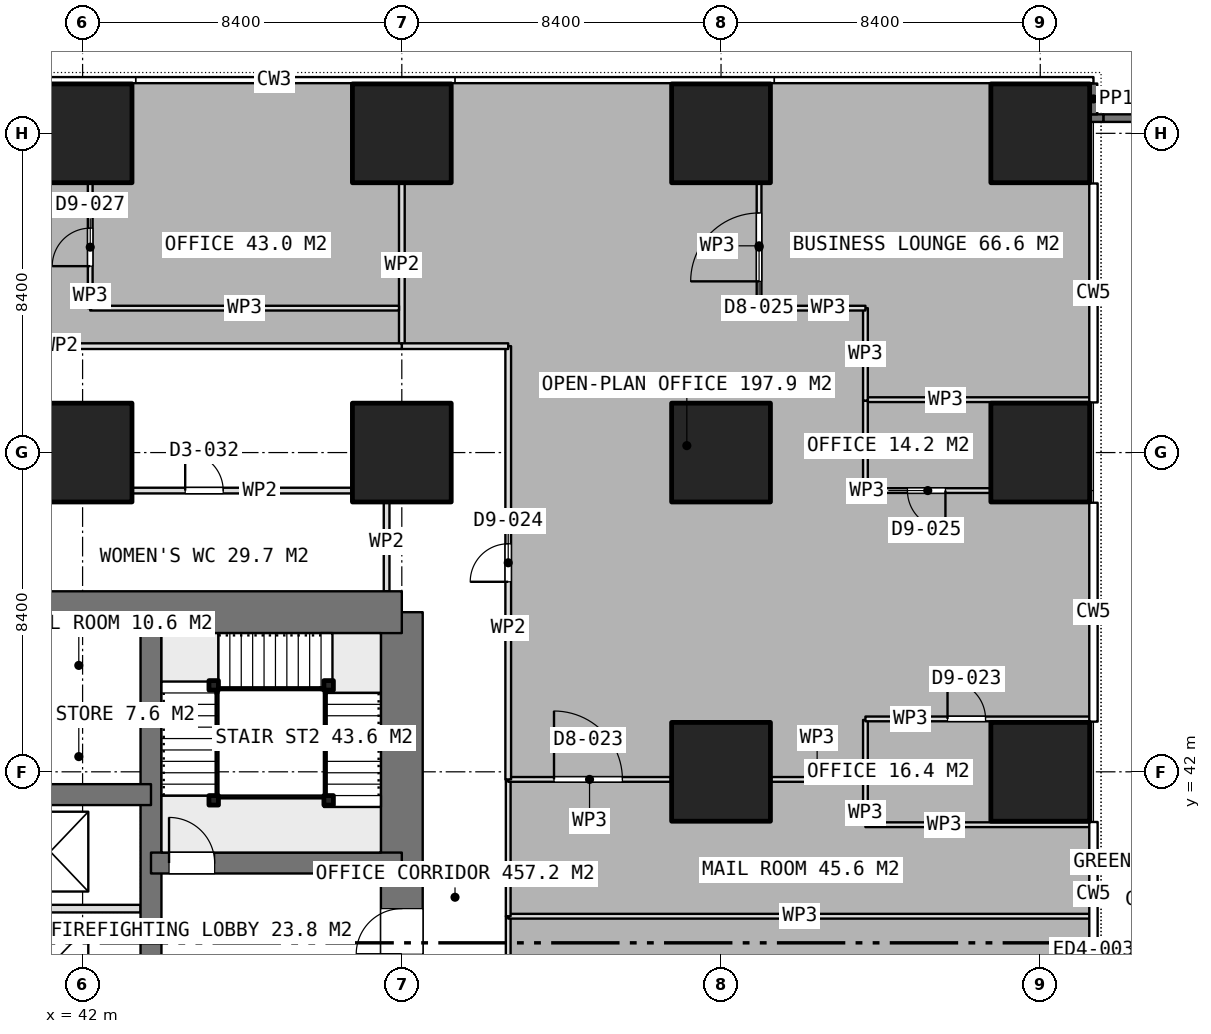
"""IFC4 building model, lengths in metres.
Left out: names, types, materials, properties, quantities, classifications, styles, units other than length and angle.
Written with IfcOpenShell. Run it as: python <this file> out.ifc"""

import sys

from ifc_helpers import new_model, si_unit, direction, frame, frame_2d, origin, origin_2d, place, context, subcontext, project, spatial, rectangle, extrude, element, fill, save


model = new_model("IFC4")
c1 = context("Model", 3, precision=1e-05, world=origin(), true_north=direction((0.0, 1.0)))
c2 = subcontext(c1, "Body", "Model", "MODEL_VIEW")
j1 = project(units=[si_unit("LENGTHUNIT", "METRE"), si_unit("PLANEANGLEUNIT", "RADIAN")], contexts=[c1])
p1 = place(None, origin())
s1 = spatial("IfcSite", under=j1, at=p1, CompositionType="ELEMENT")
p2 = place(p1, origin())
s2 = spatial("IfcBuilding", under=s1, at=p2, CompositionType="ELEMENT")
p3 = place(p2, frame((0.0, 0.0, 25.4)))
s3 = spatial("IfcBuildingStorey", under=s2, at=p3, CompositionType="ELEMENT", Elevation=25.4)
p4 = place(p3, frame((40.0, 46.2, 0.0), z_axis=(0.0, 0.0, 1.0), x_axis=(1.0, 0.0, 0.0)))
e1 = element("IfcWall", 1, at=p4, inside=s3, PredefinedType="SHEAR", context=c2, shape_type="SweptSolid", body=[
    extrude(rectangle(XDim=10.4, YDim=1.1, at=frame_2d((5.2, 0.0))), origin(), (0.0, 0.0, 1.0), 3.75),
])
p5 = place(p3, frame((50.4, 21.0, 0.0), z_axis=(0.0, 0.0, 1.0), x_axis=(0.0, 1.0, 0.0)))
e2 = element("IfcWall", 2, at=p5, inside=s3, PredefinedType="SHEAR", context=c2, shape_type="SweptSolid", body=[
    extrude(rectangle(XDim=25.2, YDim=1.1, at=frame_2d((12.6, 0.0))), origin(), (0.0, 0.0, 1.0), 3.75),
])
p6 = place(p5, frame((16.2, 0.0, 0.0)))
e3 = element("IfcOpeningElement", 3, at=p6, cuts=e2, PredefinedType="OPENING", context=c2, shape_type="SweptSolid", body=[
    extrude(rectangle(XDim=1.2, YDim=2.1, at=frame_2d((0.6, 1.05))), frame((0.0, 0.56, 0.0), z_axis=(0.0, -1.0, 0.0), x_axis=(1.0, 0.0, 0.0)), (0.0, 0.0, 1.0), 1.12),
])
p7 = place(p5, frame((10.05, 0.0, 0.0)))
e4 = element("IfcOpeningElement", 4, at=p7, cuts=e2, PredefinedType="OPENING", context=c2, shape_type="SweptSolid", body=[
    extrude(rectangle(XDim=0.9, YDim=2.1, at=frame_2d((0.45, 1.05))), frame((0.0, 0.56, 0.0), z_axis=(0.0, -1.0, 0.0), x_axis=(1.0, 0.0, 0.0)), (0.0, 0.0, 1.0), 1.12),
])
p8 = place(p5, frame((7.45, 0.0, 0.0)))
e5 = element("IfcOpeningElement", 5, at=p8, cuts=e2, PredefinedType="OPENING", context=c2, shape_type="SweptSolid", body=[
    extrude(rectangle(XDim=0.9, YDim=2.1, at=frame_2d((0.45, 1.05))), frame((0.0, 0.56, 0.0), z_axis=(0.0, -1.0, 0.0), x_axis=(1.0, 0.0, 0.0)), (0.0, 0.0, 1.0), 1.12),
])
p9 = place(p5, frame((0.75, 0.0, 0.0)))
e6 = element("IfcOpeningElement", 6, at=p9, cuts=e2, PredefinedType="OPENING", context=c2, shape_type="SweptSolid", body=[
    extrude(rectangle(XDim=1.2, YDim=2.1, at=frame_2d((0.6, 1.05))), frame((0.0, 0.56, 0.0), z_axis=(0.0, -1.0, 0.0), x_axis=(1.0, 0.0, 0.0)), (0.0, 0.0, 1.0), 1.12),
])
p10 = place(p3, frame((43.8, 21.0, 0.0), z_axis=(0.0, 0.0, 1.0), x_axis=(0.0, 1.0, 0.0)))
e7 = element("IfcWall", 7, at=p10, inside=s3, PredefinedType="SHEAR", context=c2, shape_type="SweptSolid", body=[
    extrude(rectangle(XDim=25.2, YDim=0.55, at=frame_2d((12.6, 0.0))), origin(), (0.0, 0.0, 1.0), 3.75),
])
p11 = place(p3, frame((40.0, 41.4, 0.0), z_axis=(0.0, 0.0, 1.0), x_axis=(1.0, 0.0, 0.0)))
e8 = element("IfcWall", 8, at=p11, inside=s3, PredefinedType="SHEAR", context=c2, shape_type="SweptSolid", body=[
    extrude(rectangle(XDim=3.8, YDim=0.55, at=frame_2d((1.9, 0.0))), origin(), (0.0, 0.0, 1.0), 3.75),
])
p12 = place(p3, frame((43.8, 39.6, 0.0), z_axis=(0.0, 0.0, 1.0), x_axis=(1.0, 0.0, 0.0)))
e9 = element("IfcWall", 9, at=p12, inside=s3, PredefinedType="SHEAR", context=c2, shape_type="SweptSolid", body=[
    extrude(rectangle(XDim=6.6, YDim=0.55, at=frame_2d((3.3, 0.0))), origin(), (0.0, 0.0, 1.0), 3.75),
])
p13 = place(p12, frame((0.475, 0.0, 0.0)))
e10 = element("IfcOpeningElement", 10, at=p13, cuts=e9, PredefinedType="OPENING", context=c2, shape_type="SweptSolid", body=[
    extrude(rectangle(XDim=1.2, YDim=2.1, at=frame_2d((0.6, 1.05))), frame((0.0, 0.285, 0.0), z_axis=(0.0, -1.0, 0.0), x_axis=(1.0, 0.0, 0.0)), (0.0, 0.0, 1.0), 0.57),
])
for number, where, z_axis, x_axis in (
    (11, (42.0, 50.4, 0.0), (0.0, 0.0, 1.0), (1.0, 0.0, 0.0)),
    (12, (42.0, 58.8, 0.0), (0.0, 0.0, 1.0), (1.0, 0.0, 0.0)),
    (13, (50.4, 50.4, 0.0), (0.0, 0.0, 1.0), (1.0, 0.0, 0.0)),
    (14, (50.4, 58.8, 0.0), (0.0, 0.0, 1.0), (1.0, 0.0, 0.0)),
    (15, (58.8, 42.0, 0.0), (0.0, 0.0, 1.0), (1.0, 0.0, 0.0)),
    (16, (58.8, 50.4, 0.0), (0.0, 0.0, 1.0), (1.0, 0.0, 0.0)),
    (17, (58.8, 58.8, 0.0), (0.0, 0.0, 1.0), (1.0, 0.0, 0.0)),
    (18, (67.2, 42.0, 0.0), (0.0, 0.0, 1.0), (1.0, 0.0, 0.0)),
    (19, (67.2, 50.4, 0.0), (0.0, 0.0, 1.0), (1.0, 0.0, 0.0)),
    (20, (67.2, 58.8, 0.0), (0.0, 0.0, 1.0), (1.0, 0.0, 0.0)),
):
    element("IfcColumn", number, at=place(p3, frame(where, z_axis=z_axis, x_axis=x_axis)), inside=s3, PredefinedType="COLUMN", context=c2, shape_type="SweptSolid", body=[
        extrude(rectangle(XDim=2.6, YDim=2.6, at=origin_2d()), origin(), (0.0, 0.0, 1.0), 3.75),
    ])
p14 = place(p3, frame((76.0, 59.2, 0.0), z_axis=(0.0, 0.0, 1.0), x_axis=(-1.0, 0.0, 0.0)))
e21 = element("IfcWall", 21, at=p14, inside=s3, PredefinedType="PARAPET", context=c2, shape_type="SweptSolid", body=[
    extrude(rectangle(XDim=7.14, YDim=0.2, at=frame_2d((3.57, 0.0))), origin(), (0.0, 0.0, 1.0), 1.1),
])
p15 = place(p3, frame((68.86, 59.2, 0.0), z_axis=(0.0, 0.0, 1.0), x_axis=(-1.0, 0.0, 0.0)))
e22 = element("IfcWall", 22, at=p15, inside=s3, PredefinedType="PARAPET", context=c2, shape_type="SweptSolid", body=[
    extrude(rectangle(XDim=0.36, YDim=0.2, at=frame_2d((0.18, 0.0))), origin(), (0.0, 0.0, 1.0), 1.1),
])
p16 = place(p3, frame((68.6, 59.3, 0.0), z_axis=(0.0, 0.0, 1.0), x_axis=(0.0, 1.0, 0.0)))
e23 = element("IfcWall", 23, at=p16, inside=s3, PredefinedType="PARAPET", context=c2, shape_type="SweptSolid", body=[
    extrude(rectangle(XDim=0.81, YDim=0.2, at=frame_2d((0.405, 0.0))), origin(), (0.0, 0.0, 1.0), 1.1),
])
p17 = place(p3, frame((40.275, 38.4, 0.0), z_axis=(0.0, 0.0, 1.0), x_axis=(1.0, 0.0, 0.0)))
e24 = element("IfcWall", 24, at=p17, inside=s3, PredefinedType="PARTITIONING", context=c2, shape_type="SweptSolid", body=[
    extrude(rectangle(XDim=3.25, YDim=0.2, at=frame_2d((1.625, 0.0))), origin(), (0.0, 0.0, 1.0), 3.5),
])
p18 = place(p3, frame((40.0, 43.4, 0.0), z_axis=(0.0, 0.0, 1.0), x_axis=(1.0, 0.0, 0.0)))
e25 = element("IfcWall", 25, at=p18, inside=s3, PredefinedType="PARTITIONING", context=c2, shape_type="SweptSolid", body=[
    extrude(rectangle(XDim=3.525, YDim=0.2, at=frame_2d((1.762, 0.0))), origin(), (0.0, 0.0, 1.0), 3.5),
])
p19 = place(p3, frame((40.325, 49.4, 0.0), z_axis=(0.0, 0.0, 1.0), x_axis=(1.0, 0.0, 0.0)))
e26 = element("IfcWall", 26, at=p19, inside=s3, PredefinedType="PARTITIONING", context=c2, shape_type="SweptSolid", body=[
    extrude(rectangle(XDim=9.75, YDim=0.15, at=frame_2d((4.875, 0.0))), origin(), (0.0, 0.0, 1.0), 3.5),
])
p20 = place(p19, frame((4.375, 0.0, 0.0)))
e27 = element("IfcOpeningElement", 27, at=p20, cuts=e26, PredefinedType="OPENING", context=c2, shape_type="SweptSolid", body=[
    extrude(rectangle(XDim=1.0, YDim=2.1, at=frame_2d((0.5, 1.05))), frame((0.0, 0.085, 0.0), z_axis=(0.0, -1.0, 0.0), x_axis=(1.0, 0.0, 0.0)), (0.0, 0.0, 1.0), 0.17),
])
p21 = place(p3, frame((50.0, 46.75, 0.0), z_axis=(0.0, 0.0, 1.0), x_axis=(0.0, 1.0, 0.0)))
e28 = element("IfcWall", 28, at=p21, inside=s3, PredefinedType="PARTITIONING", context=c2, shape_type="SweptSolid", body=[
    extrude(rectangle(XDim=2.575, YDim=0.15, at=frame_2d((1.288, 0.0))), origin(), (0.0, 0.0, 1.0), 3.5),
])
p22 = place(p3, frame((68.52, 40.608, 0.0), z_axis=(0.0, 0.0, 1.0), x_axis=(-1.0, 0.0, 0.0)))
e29 = element("IfcWall", 29, at=p22, inside=s3, PredefinedType="PARTITIONING", context=c2, shape_type="SweptSolid", body=[
    extrude(rectangle(XDim=5.92, YDim=0.125, at=frame_2d((2.96, 0.0))), origin(), (0.0, 0.0, 1.0), 3.5),
])
p23 = place(p3, frame((62.6, 40.636, 0.0), z_axis=(0.0, 0.0, 1.0), x_axis=(0.0, 1.0, 0.0)))
e30 = element("IfcWall", 30, at=p23, inside=s3, PredefinedType="PARTITIONING", context=c2, shape_type="SweptSolid", body=[
    extrude(rectangle(XDim=2.729, YDim=0.125, at=frame_2d((1.365, 0.0))), origin(), (0.0, 0.0, 1.0), 3.5),
])
p24 = place(p3, frame((62.6, 43.392, 0.0), z_axis=(0.0, 0.0, 1.0), x_axis=(1.0, 0.0, 0.0)))
e31 = element("IfcWall", 31, at=p24, inside=s3, PredefinedType="PARTITIONING", context=c2, shape_type="SweptSolid", body=[
    extrude(rectangle(XDim=5.92, YDim=0.125, at=frame_2d((2.96, 0.0))), origin(), (0.0, 0.0, 1.0), 3.5),
])
p25 = place(p24, frame((2.16, 0.0, 0.0)))
e32 = element("IfcOpeningElement", 32, at=p25, cuts=e31, PredefinedType="OPENING", context=c2, shape_type="SweptSolid", body=[
    extrude(rectangle(XDim=1.0, YDim=2.1, at=frame_2d((0.5, 1.05))), frame((0.0, 0.073, 0.0), z_axis=(0.0, -1.0, 0.0), x_axis=(1.0, 0.0, 0.0)), (0.0, 0.0, 1.0), 0.145),
])
p26 = place(p3, frame((65.88, 49.4, 0.0), z_axis=(0.0, 0.0, 1.0), x_axis=(-1.0, 0.0, 0.0)))
e33 = element("IfcWall", 33, at=p26, inside=s3, PredefinedType="PARTITIONING", context=c2, shape_type="SweptSolid", body=[
    extrude(rectangle(XDim=3.28, YDim=0.125, at=frame_2d((1.64, 0.0))), origin(), (0.0, 0.0, 1.0), 3.5),
])
p27 = place(p26, frame((1.175, 0.0, 0.0)))
e34 = element("IfcOpeningElement", 34, at=p27, cuts=e33, PredefinedType="OPENING", context=c2, shape_type="SweptSolid", body=[
    extrude(rectangle(XDim=1.0, YDim=2.1, at=frame_2d((0.5, 1.05))), frame((0.0, 0.073, 0.0), z_axis=(0.0, -1.0, 0.0), x_axis=(1.0, 0.0, 0.0)), (0.0, 0.0, 1.0), 0.145),
])
p28 = place(p3, frame((62.6, 49.4, 0.0), z_axis=(0.0, 0.0, 1.0), x_axis=(0.0, 1.0, 0.0)))
e35 = element("IfcWall", 35, at=p28, inside=s3, PredefinedType="PARTITIONING", context=c2, shape_type="SweptSolid", body=[
    extrude(rectangle(XDim=2.365, YDim=0.125, at=frame_2d((1.183, 0.0))), origin(), (0.0, 0.0, 1.0), 3.5),
])
p29 = place(p3, frame((62.663, 51.792, 0.0), z_axis=(0.0, 0.0, 1.0), x_axis=(1.0, 0.0, 0.0)))
e36 = element("IfcWall", 36, at=p29, inside=s3, PredefinedType="PARTITIONING", context=c2, shape_type="SweptSolid", body=[
    extrude(rectangle(XDim=5.857, YDim=0.125, at=frame_2d((2.928, 0.0))), origin(), (0.0, 0.0, 1.0), 3.5),
])
p30 = place(p3, frame((59.801, 54.2, 0.0), z_axis=(0.0, 0.0, 1.0), x_axis=(0.0, 1.0, 0.0)))
e37 = element("IfcWall", 37, at=p30, inside=s3, PredefinedType="PARTITIONING", context=c2, shape_type="SweptSolid", body=[
    extrude(rectangle(XDim=3.28, YDim=0.125, at=frame_2d((1.64, 0.0))), origin(), (0.0, 0.0, 1.0), 3.5),
])
p31 = place(p30, frame((0.705, 0.0, 0.0)))
e38 = element("IfcOpeningElement", 38, at=p31, cuts=e37, PredefinedType="OPENING", context=c2, shape_type="SweptSolid", body=[
    extrude(rectangle(XDim=1.8, YDim=2.1, at=frame_2d((0.9, 1.05))), frame((0.0, 0.073, 0.0), z_axis=(0.0, -1.0, 0.0), x_axis=(1.0, 0.0, 0.0)), (0.0, 0.0, 1.0), 0.145),
])
p32 = place(p3, frame((62.6, 51.766, 0.0), z_axis=(0.0, 0.0, 1.0), x_axis=(0.0, 1.0, 0.0)))
e39 = element("IfcWall", 39, at=p32, inside=s3, PredefinedType="PARTITIONING", context=c2, shape_type="SweptSolid", body=[
    extrude(rectangle(XDim=2.434, YDim=0.125, at=frame_2d((1.217, 0.0))), origin(), (0.0, 0.0, 1.0), 3.5),
])
p33 = place(p3, frame((62.6, 54.2, 0.0), z_axis=(0.0, 0.0, 1.0), x_axis=(-1.0, 0.0, 0.0)))
e40 = element("IfcWall", 40, at=p33, inside=s3, PredefinedType="PARTITIONING", context=c2, shape_type="SweptSolid", body=[
    extrude(rectangle(XDim=2.799, YDim=0.125, at=frame_2d((1.399, 0.0))), origin(), (0.0, 0.0, 1.0), 3.5),
])
p34 = place(p3, frame((53.2, 31.2, 0.0), z_axis=(0.0, 0.0, 1.0), x_axis=(0.0, 1.0, 0.0)))
e41 = element("IfcWall", 41, at=p34, inside=s3, PredefinedType="PARTITIONING", context=c2, shape_type="SweptSolid", body=[
    extrude(rectangle(XDim=7.0, YDim=0.125, at=frame_2d((3.5, 0.0))), origin(), (0.0, 0.0, 1.0), 3.5),
])
p35 = place(p3, frame((53.2, 38.2, 0.0), z_axis=(0.0, 0.0, 1.0), x_axis=(1.0, 0.0, 0.0)))
e42 = element("IfcWall", 42, at=p35, inside=s3, PredefinedType="PARTITIONING", context=c2, shape_type="SweptSolid", body=[
    extrude(rectangle(XDim=15.35, YDim=0.125, at=frame_2d((7.675, 0.0))), origin(), (0.0, 0.0, 1.0), 3.5),
])
p36 = place(p3, frame((53.2, 38.2, 0.0), z_axis=(0.0, 0.0, 1.0), x_axis=(0.0, 1.0, 0.0)))
e43 = element("IfcWall", 43, at=p36, inside=s3, PredefinedType="PARTITIONING", context=c2, shape_type="SweptSolid", body=[
    extrude(rectangle(XDim=3.6, YDim=0.125, at=frame_2d((1.8, 0.0))), origin(), (0.0, 0.0, 1.0), 3.5),
])
p37 = place(p3, frame((53.2, 41.8, 0.0), z_axis=(0.0, 0.0, 1.0), x_axis=(1.0, 0.0, 0.0)))
e44 = element("IfcWall", 44, at=p37, inside=s3, PredefinedType="PARTITIONING", context=c2, shape_type="SweptSolid", body=[
    extrude(rectangle(XDim=4.28, YDim=0.125, at=frame_2d((2.14, 0.0))), origin(), (0.0, 0.0, 1.0), 3.5),
])
p38 = place(p37, frame((1.205, 0.0, 0.0)))
e45 = element("IfcOpeningElement", 45, at=p38, cuts=e44, PredefinedType="OPENING", context=c2, shape_type="SweptSolid", body=[
    extrude(rectangle(XDim=1.8, YDim=2.1, at=frame_2d((0.9, 1.05))), frame((0.0, 0.073, 0.0), z_axis=(0.0, -1.0, 0.0), x_axis=(1.0, 0.0, 0.0)), (0.0, 0.0, 1.0), 0.145),
])
p39 = place(p3, frame((60.12, 41.8, 0.0), z_axis=(0.0, 0.0, 1.0), x_axis=(1.0, 0.0, 0.0)))
e46 = element("IfcWall", 46, at=p39, inside=s3, PredefinedType="PARTITIONING", context=c2, shape_type="SweptSolid", body=[
    extrude(rectangle(XDim=2.418, YDim=0.125, at=frame_2d((1.209, 0.0))), origin(), (0.0, 0.0, 1.0), 3.5),
])
p40 = place(p3, frame((50.401, 53.2, 0.0), z_axis=(0.0, 0.0, 1.0), x_axis=(0.0, 1.0, 0.0)))
e47 = element("IfcWall", 47, at=p40, inside=s3, PredefinedType="PARTITIONING", context=c2, shape_type="SweptSolid", body=[
    extrude(rectangle(XDim=4.28, YDim=0.15, at=frame_2d((2.14, 0.0))), origin(), (0.0, 0.0, 1.0), 3.5),
])
p41 = place(p3, frame((53.2, 41.8, 0.0), z_axis=(0.0, 0.0, 1.0), x_axis=(0.0, 1.0, 0.0)))
e48 = element("IfcWall", 48, at=p41, inside=s3, PredefinedType="PARTITIONING", context=c2, shape_type="SweptSolid", body=[
    extrude(rectangle(XDim=11.4, YDim=0.15, at=frame_2d((5.7, 0.0))), origin(), (0.0, 0.0, 1.0), 3.5),
])
p42 = place(p41, frame((5.2, 0.0, 0.0)))
e49 = element("IfcOpeningElement", 49, at=p42, cuts=e48, PredefinedType="OPENING", context=c2, shape_type="SweptSolid", body=[
    extrude(rectangle(XDim=1.0, YDim=2.1, at=frame_2d((0.5, 1.05))), frame((0.0, 0.085, 0.0), z_axis=(0.0, -1.0, 0.0), x_axis=(1.0, 0.0, 0.0)), (0.0, 0.0, 1.0), 0.17),
])
p43 = place(p3, frame((53.2, 53.2, 0.0), z_axis=(0.0, 0.0, 1.0), x_axis=(-1.0, 0.0, 0.0)))
e50 = element("IfcWall", 50, at=p43, inside=s3, PredefinedType="PARTITIONING", context=c2, shape_type="SweptSolid", body=[
    extrude(rectangle(XDim=2.799, YDim=0.15, at=frame_2d((1.399, 0.0))), origin(), (0.0, 0.0, 1.0), 3.5),
])
p44 = place(p3, frame((50.326, 54.2, 0.0), z_axis=(0.0, 0.0, 1.0), x_axis=(-1.0, 0.0, 0.0)))
e51 = element("IfcWall", 51, at=p44, inside=s3, PredefinedType="PARTITIONING", context=c2, shape_type="SweptSolid", body=[
    extrude(rectangle(XDim=8.125, YDim=0.125, at=frame_2d((4.062, 0.0))), origin(), (0.0, 0.0, 1.0), 3.5),
])
p45 = place(p3, frame((42.201, 54.2, 0.0), z_axis=(0.0, 0.0, 1.0), x_axis=(0.0, 1.0, 0.0)))
e52 = element("IfcWall", 52, at=p45, inside=s3, PredefinedType="PARTITIONING", context=c2, shape_type="SweptSolid", body=[
    extrude(rectangle(XDim=3.28, YDim=0.125, at=frame_2d((1.64, 0.0))), origin(), (0.0, 0.0, 1.0), 3.5),
])
p46 = place(p45, frame((1.105, 0.0, 0.0)))
e53 = element("IfcOpeningElement", 53, at=p46, cuts=e52, PredefinedType="OPENING", context=c2, shape_type="SweptSolid", body=[
    extrude(rectangle(XDim=1.0, YDim=2.1, at=frame_2d((0.5, 1.05))), frame((0.0, 0.073, 0.0), z_axis=(0.0, -1.0, 0.0), x_axis=(1.0, 0.0, 0.0)), (0.0, 0.0, 1.0), 0.145),
])
p47 = place(p3, frame((50.399, 53.2, 0.0), z_axis=(0.0, 0.0, 1.0), x_axis=(-1.0, 0.0, 0.0)))
e54 = element("IfcWall", 54, at=p47, inside=s3, PredefinedType="PARTITIONING", context=c2, shape_type="SweptSolid", body=[
    extrude(rectangle(XDim=25.649, YDim=0.15, at=frame_2d((12.824, 0.0))), origin(), (0.0, 0.0, 1.0), 3.5),
])
p48 = place(p47, frame((12.325, 0.0, 0.0)))
e55 = element("IfcOpeningElement", 55, at=p48, cuts=e54, PredefinedType="OPENING", context=c2, shape_type="SweptSolid", body=[
    extrude(rectangle(XDim=1.0, YDim=2.1, at=frame_2d((0.5, 1.05))), frame((0.0, 0.085, 0.0), z_axis=(0.0, -1.0, 0.0), x_axis=(1.0, 0.0, 0.0)), (0.0, 0.0, 1.0), 0.17),
])
for number, where, z_axis, x_axis in (
    (56, (45.45, 41.25, 0.0), (0.0, 0.0, 1.0), (1.0, 0.0, 0.0)),
    (57, (45.45, 44.275, 0.0), (0.0, 0.0, 1.0), (1.0, 0.0, 0.0)),
    (58, (48.475, 44.275, 0.0), (0.0, 0.0, 1.0), (1.0, 0.0, 0.0)),
    (59, (48.475, 41.25, 0.0), (0.0, 0.0, 1.0), (1.0, 0.0, 0.0)),
):
    element("IfcColumn", number, at=place(p3, frame(where, z_axis=z_axis, x_axis=x_axis)), inside=s3, PredefinedType="COLUMN", context=c2, shape_type="SweptSolid", body=[
        extrude(rectangle(XDim=0.25, YDim=0.25, at=origin_2d()), origin(), (0.0, 0.0, 1.0), 3.75),
    ])
p49 = place(p6, origin())
e60 = element("IfcDoor", 60, at=p49, inside=s3, OperationType="SINGLE_SWING_LEFT", PredefinedType="DOOR", context=c2, shape_type="SweptSolid", body=[
    extrude(rectangle(XDim=1.2, YDim=2.1, at=frame_2d((0.6, 1.05))), frame((0.0, 0.025, 0.0), z_axis=(0.0, -1.0, 0.0), x_axis=(1.0, 0.0, 0.0)), (0.0, 0.0, 1.0), 0.05),
])
fill(e3, e60)
p50 = place(p20, origin())
e61 = element("IfcDoor", 61, at=p50, inside=s3, OperationType="SINGLE_SWING_LEFT", PredefinedType="DOOR", context=c2, shape_type="SweptSolid", body=[
    extrude(rectangle(XDim=1.0, YDim=2.1, at=frame_2d((0.5, 1.05))), frame((0.0, 0.025, 0.0), z_axis=(0.0, -1.0, 0.0), x_axis=(1.0, 0.0, 0.0)), (0.0, 0.0, 1.0), 0.05),
])
fill(e27, e61)
p51 = place(p25, origin())
e62 = element("IfcDoor", 62, at=p51, inside=s3, OperationType="SINGLE_SWING_LEFT", PredefinedType="DOOR", context=c2, shape_type="SweptSolid", body=[
    extrude(rectangle(XDim=1.0, YDim=2.1, at=frame_2d((0.5, 1.05))), frame((0.0, 0.025, 0.0), z_axis=(0.0, -1.0, 0.0), x_axis=(1.0, 0.0, 0.0)), (0.0, 0.0, 1.0), 0.05),
])
fill(e32, e62)
p52 = place(p27, origin())
e63 = element("IfcDoor", 63, at=p52, inside=s3, OperationType="SINGLE_SWING_LEFT", PredefinedType="DOOR", context=c2, shape_type="SweptSolid", body=[
    extrude(rectangle(XDim=1.0, YDim=2.1, at=frame_2d((0.5, 1.05))), frame((0.0, 0.025, 0.0), z_axis=(0.0, -1.0, 0.0), x_axis=(1.0, 0.0, 0.0)), (0.0, 0.0, 1.0), 0.05),
])
fill(e34, e63)
p53 = place(p31, origin())
e64 = element("IfcDoor", 64, at=p53, inside=s3, OperationType="DOUBLE_DOOR_SINGLE_SWING", PredefinedType="DOOR", context=c2, shape_type="SweptSolid", body=[
    extrude(rectangle(XDim=1.8, YDim=2.1, at=frame_2d((0.9, 1.05))), frame((0.0, 0.025, 0.0), z_axis=(0.0, -1.0, 0.0), x_axis=(1.0, 0.0, 0.0)), (0.0, 0.0, 1.0), 0.05),
])
fill(e38, e64)
p54 = place(p38, origin())
e65 = element("IfcDoor", 65, at=p54, inside=s3, OperationType="DOUBLE_DOOR_SINGLE_SWING", PredefinedType="DOOR", context=c2, shape_type="SweptSolid", body=[
    extrude(rectangle(XDim=1.8, YDim=2.1, at=frame_2d((0.9, 1.05))), frame((0.0, 0.025, 0.0), z_axis=(0.0, -1.0, 0.0), x_axis=(1.0, 0.0, 0.0)), (0.0, 0.0, 1.0), 0.05),
])
fill(e45, e65)
p55 = place(p42, origin())
e66 = element("IfcDoor", 66, at=p55, inside=s3, OperationType="SINGLE_SWING_LEFT", PredefinedType="DOOR", context=c2, shape_type="SweptSolid", body=[
    extrude(rectangle(XDim=1.0, YDim=2.1, at=frame_2d((0.5, 1.05))), frame((0.0, 0.025, 0.0), z_axis=(0.0, -1.0, 0.0), x_axis=(1.0, 0.0, 0.0)), (0.0, 0.0, 1.0), 0.05),
])
fill(e49, e66)
p56 = place(p46, origin())
e67 = element("IfcDoor", 67, at=p56, inside=s3, OperationType="SINGLE_SWING_LEFT", PredefinedType="DOOR", context=c2, shape_type="SweptSolid", body=[
    extrude(rectangle(XDim=1.0, YDim=2.1, at=frame_2d((0.5, 1.05))), frame((0.0, 0.025, 0.0), z_axis=(0.0, -1.0, 0.0), x_axis=(1.0, 0.0, 0.0)), (0.0, 0.0, 1.0), 0.05),
])
fill(e53, e67)
p57 = place(p13, origin())
e68 = element("IfcDoor", 68, at=p57, inside=s3, OperationType="SINGLE_SWING_RIGHT", PredefinedType="DOOR", context=c2, shape_type="SweptSolid", body=[
    extrude(rectangle(XDim=1.2, YDim=2.1, at=frame_2d((0.6, 1.05))), frame((0.0, 0.025, 0.0), z_axis=(0.0, -1.0, 0.0), x_axis=(1.0, 0.0, 0.0)), (0.0, 0.0, 1.0), 0.05),
])
fill(e10, e68)
save(model, sys.argv[1])
